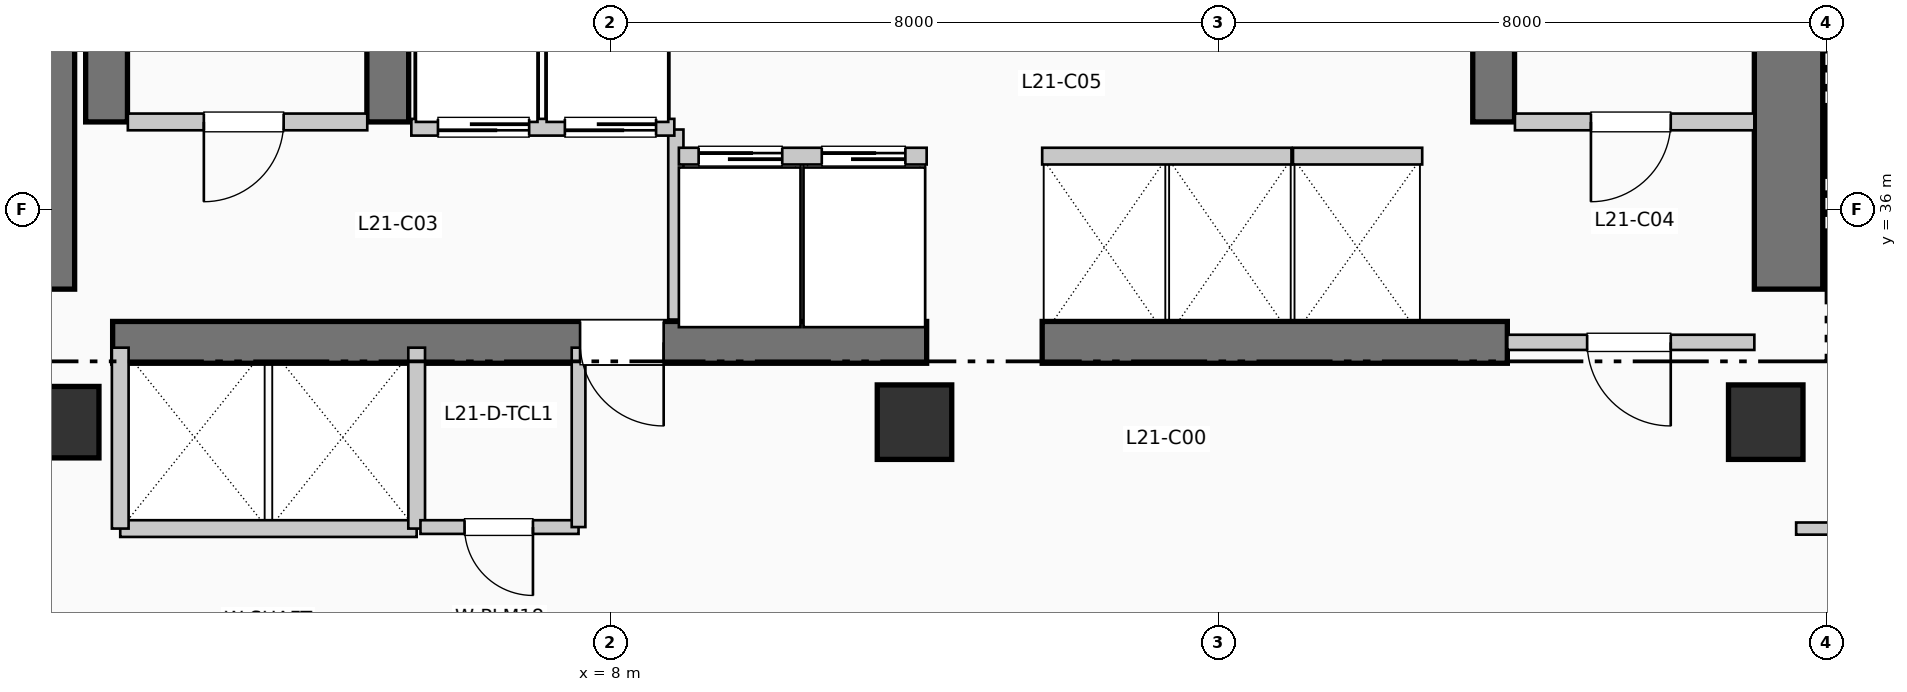
"""IFC4 building model, lengths in metres.
Left out: names, types, materials, properties, quantities, classifications, styles, units other than length and angle.
Written with IfcOpenShell. Run it as: python <this file> out.ifc"""

import sys

from ifc_helpers import new_model, si_unit, direction, frame, frame_2d, origin, origin_2d, place, context, subcontext, project, spatial, rectangle, extrude, element, fill, save


model = new_model("IFC4")
c1 = context("Model", 3, precision=1e-05, world=origin(), true_north=direction((0.0, 1.0)))
c2 = subcontext(c1, "Body", "Model", "MODEL_VIEW")
j1 = project(units=[si_unit("LENGTHUNIT", "METRE"), si_unit("PLANEANGLEUNIT", "RADIAN")], contexts=[c1])
p1 = place(None, origin())
s1 = spatial("IfcSite", under=j1, at=p1, CompositionType="ELEMENT")
p2 = place(p1, origin())
s2 = spatial("IfcBuilding", under=s1, at=p2, CompositionType="ELEMENT")
p3 = place(p2, frame((0.0, 0.0, 89.76)))
s3 = spatial("IfcBuildingStorey", under=s2, at=p3, CompositionType="ELEMENT", Elevation=89.76)
p4 = place(p3, frame((0.5, 34.95, 0.0), z_axis=(0.0, 0.0, 1.0), x_axis=(0.0, 1.0, 0.0)))
e1 = element("IfcWall", 1, at=p4, inside=s3, PredefinedType="SHEAR", context=c2, shape_type="SweptSolid", body=[
    extrude(rectangle(XDim=7.9, YDim=0.9, at=frame_2d((3.95, 0.0))), origin(), (0.0, 0.0, 1.0), 3.96),
])
p5 = place(p3, frame((23.5, 34.95, 0.0), z_axis=(0.0, 0.0, 1.0), x_axis=(0.0, 1.0, 0.0)))
e2 = element("IfcWall", 2, at=p5, inside=s3, PredefinedType="SHEAR", context=c2, shape_type="SweptSolid", body=[
    extrude(rectangle(XDim=10.64, YDim=0.9, at=frame_2d((5.32, 0.0))), origin(), (0.0, 0.0, 1.0), 3.96),
])
p6 = place(p3, frame((1.45, 34.25, 0.0), z_axis=(0.0, 0.0, 1.0), x_axis=(1.0, 0.0, 0.0)))
e3 = element("IfcWall", 3, at=p6, inside=s3, PredefinedType="SHEAR", context=c2, shape_type="SweptSolid", body=[
    extrude(rectangle(XDim=10.71, YDim=0.55, at=frame_2d((5.355, 0.0))), origin(), (0.0, 0.0, 1.0), 3.96),
])
p7 = place(p6, frame((7.25, 0.0, 0.0), z_axis=(0.0, 0.0, 1.0), x_axis=(-1.0, 0.0, 0.0)))
e4 = element("IfcOpeningElement", 4, at=p7, cuts=e3, PredefinedType="OPENING", context=c2, shape_type="SweptSolid", body=[
    extrude(rectangle(XDim=1.1, YDim=2.15, at=frame_2d((0.55, 1.075))), frame((0.0, 0.285, 0.0), z_axis=(0.0, -1.0, 0.0), x_axis=(1.0, 0.0, 0.0)), (0.0, 0.0, 1.0), 0.57),
])
p8 = place(p3, frame((13.68, 34.25, 0.0), z_axis=(0.0, 0.0, 1.0), x_axis=(1.0, 0.0, 0.0)))
e5 = element("IfcWall", 5, at=p8, inside=s3, PredefinedType="SHEAR", context=c2, shape_type="SweptSolid", body=[
    extrude(rectangle(XDim=6.12, YDim=0.55, at=frame_2d((3.06, 0.0))), origin(), (0.0, 0.0, 1.0), 3.96),
])
for number, where, z_axis, x_axis in (
    (6, (1.37, 37.15, 0.0), (0.0, 0.0, 1.0), (0.0, 1.0, 0.0)),
    (7, (5.07, 37.15, 0.0), (0.0, 0.0, 1.0), (0.0, 1.0, 0.0)),
    (8, (19.62, 37.15, 0.0), (0.0, 0.0, 1.0), (0.0, 1.0, 0.0)),
):
    element("IfcWall", number, at=place(p3, frame(where, z_axis=z_axis, x_axis=x_axis)), inside=s3, PredefinedType="SHEAR", context=c2, shape_type="SweptSolid", body=[
        extrude(rectangle(XDim=7.89, YDim=0.55, at=frame_2d((3.945, 0.0))), origin(), (0.0, 0.0, 1.0), 3.96),
    ])
p9 = place(p3, frame((0.8, 33.2, 0.0), z_axis=(0.0, 0.0, 1.0), x_axis=(1.0, 0.0, 0.0)))
e9 = element("IfcColumn", 9, at=p9, inside=s3, PredefinedType="COLUMN", context=c2, shape_type="SweptSolid", body=[
    extrude(rectangle(XDim=0.94, YDim=0.94, at=origin_2d()), origin(), (0.0, 0.0, 1.0), 3.96),
])
for number, where, z_axis, x_axis in (
    (10, (12.0, 33.2, 0.0), (0.0, 0.0, 1.0), (1.0, 0.0, 0.0)),
    (11, (23.2, 33.2, 0.0), (0.0, 0.0, 1.0), (1.0, 0.0, 0.0)),
):
    element("IfcColumn", number, at=place(p3, frame(where, z_axis=z_axis, x_axis=x_axis)), inside=s3, PredefinedType="COLUMN", context=c2, shape_type="SweptSolid", body=[
        extrude(rectangle(XDim=0.98, YDim=0.98, at=origin_2d()), origin(), (0.0, 0.0, 1.0), 3.96),
    ])
p10 = place(p3, frame((1.65, 37.15, 0.0), z_axis=(0.0, 0.0, 1.0), x_axis=(1.0, 0.0, 0.0)))
e12 = element("IfcWall", 12, at=p10, inside=s3, PredefinedType="PARTITIONING", context=c2, shape_type="SweptSolid", body=[
    extrude(rectangle(XDim=3.15, YDim=0.22, at=frame_2d((1.575, 0.0))), origin(), (0.0, 0.0, 1.0), 3.61),
])
p11 = place(p10, frame((2.05, 0.0, 0.0), z_axis=(0.0, 0.0, 1.0), x_axis=(-1.0, 0.0, 0.0)))
e13 = element("IfcOpeningElement", 13, at=p11, cuts=e12, PredefinedType="OPENING", context=c2, shape_type="SweptSolid", body=[
    extrude(rectangle(XDim=1.05, YDim=2.15, at=frame_2d((0.525, 1.075))), frame((0.0, 0.12, 0.0), z_axis=(0.0, -1.0, 0.0), x_axis=(1.0, 0.0, 0.0)), (0.0, 0.0, 1.0), 0.24),
])
p12 = place(p3, frame((8.86, 34.55, 0.0), z_axis=(0.0, 0.0, 1.0), x_axis=(0.0, 1.0, 0.0)))
e14 = element("IfcWall", 14, at=p12, inside=s3, PredefinedType="PARTITIONING", context=c2, shape_type="SweptSolid", body=[
    extrude(rectangle(XDim=2.5, YDim=0.2, at=frame_2d((1.25, 0.0))), origin(), (0.0, 0.0, 1.0), 3.61),
])
p13 = place(p3, frame((19.9, 37.15, 0.0), z_axis=(0.0, 0.0, 1.0), x_axis=(1.0, 0.0, 0.0)))
e15 = element("IfcWall", 15, at=p13, inside=s3, PredefinedType="PARTITIONING", context=c2, shape_type="SweptSolid", body=[
    extrude(rectangle(XDim=3.15, YDim=0.22, at=frame_2d((1.575, 0.0))), origin(), (0.0, 0.0, 1.0), 3.61),
])
p14 = place(p13, frame((2.05, 0.0, 0.0), z_axis=(0.0, 0.0, 1.0), x_axis=(-1.0, 0.0, 0.0)))
e16 = element("IfcOpeningElement", 16, at=p14, cuts=e15, PredefinedType="OPENING", context=c2, shape_type="SweptSolid", body=[
    extrude(rectangle(XDim=1.05, YDim=2.15, at=frame_2d((0.525, 1.075))), frame((0.0, 0.12, 0.0), z_axis=(0.0, -1.0, 0.0), x_axis=(1.0, 0.0, 0.0)), (0.0, 0.0, 1.0), 0.24),
])
p15 = place(p3, frame((19.8, 34.25, 0.0), z_axis=(0.0, 0.0, 1.0), x_axis=(1.0, 0.0, 0.0)))
e17 = element("IfcWall", 17, at=p15, inside=s3, PredefinedType="PARTITIONING", context=c2, shape_type="SweptSolid", body=[
    extrude(rectangle(XDim=3.25, YDim=0.2, at=frame_2d((1.625, 0.0))), origin(), (0.0, 0.0, 1.0), 3.61),
])
p16 = place(p15, frame((2.15, 0.0, 0.0), z_axis=(0.0, 0.0, 1.0), x_axis=(-1.0, 0.0, 0.0)))
e18 = element("IfcOpeningElement", 18, at=p16, cuts=e17, PredefinedType="OPENING", context=c2, shape_type="SweptSolid", body=[
    extrude(rectangle(XDim=1.1, YDim=2.15, at=frame_2d((0.55, 1.075))), frame((0.0, 0.11, 0.0), z_axis=(0.0, -1.0, 0.0), x_axis=(1.0, 0.0, 0.0)), (0.0, 0.0, 1.0), 0.22),
])
p17 = place(p3, frame((5.38, 37.08, 0.0), z_axis=(0.0, 0.0, 1.0), x_axis=(1.0, 0.0, 0.0)))
e19 = element("IfcWall", 19, at=p17, inside=s3, PredefinedType="PARTITIONING", context=c2, shape_type="SweptSolid", body=[
    extrude(rectangle(XDim=3.46, YDim=0.22, at=frame_2d((1.73, 0.0))), origin(), (0.0, 0.0, 1.0), 3.61),
])
p18 = place(p17, frame((1.55, 0.0, 0.0), z_axis=(0.0, 0.0, 1.0), x_axis=(-1.0, 0.0, 0.0)))
e20 = element("IfcOpeningElement", 20, at=p18, cuts=e19, PredefinedType="OPENING", context=c2, shape_type="SweptSolid", body=[
    extrude(rectangle(XDim=1.2, YDim=2.2, at=frame_2d((0.6, 1.1))), frame((0.0, 0.12, 0.0), z_axis=(0.0, -1.0, 0.0), x_axis=(1.0, 0.0, 0.0)), (0.0, 0.0, 1.0), 0.24),
])
p19 = place(p17, frame((3.22, 0.0, 0.0), z_axis=(0.0, 0.0, 1.0), x_axis=(-1.0, 0.0, 0.0)))
e21 = element("IfcOpeningElement", 21, at=p19, cuts=e19, PredefinedType="OPENING", context=c2, shape_type="SweptSolid", body=[
    extrude(rectangle(XDim=1.2, YDim=2.2, at=frame_2d((0.6, 1.1))), frame((0.0, 0.12, 0.0), z_axis=(0.0, -1.0, 0.0), x_axis=(1.0, 0.0, 0.0)), (0.0, 0.0, 1.0), 0.24),
])
p20 = place(p3, frame((1.55, 31.8, 0.0), z_axis=(0.0, 0.0, 1.0), x_axis=(1.0, 0.0, 0.0)))
e22 = element("IfcWall", 22, at=p20, inside=s3, PredefinedType="PARTITIONING", context=c2, shape_type="SweptSolid", body=[
    extrude(rectangle(XDim=3.9, YDim=0.22, at=frame_2d((1.95, 0.0))), origin(), (0.0, 0.0, 1.0), 3.61),
])
for number, where, z_axis, x_axis in (
    (23, (1.55, 31.8, 0.0), (0.0, 0.0, 1.0), (0.0, 1.0, 0.0)),
    (24, (5.45, 31.8, 0.0), (0.0, 0.0, 1.0), (0.0, 1.0, 0.0)),
):
    element("IfcWall", number, at=place(p3, frame(where, z_axis=z_axis, x_axis=x_axis)), inside=s3, PredefinedType="PARTITIONING", context=c2, shape_type="SweptSolid", body=[
        extrude(rectangle(XDim=2.38, YDim=0.22, at=frame_2d((1.19, 0.0))), origin(), (0.0, 0.0, 1.0), 3.61),
    ])
p21 = place(p3, frame((5.5, 31.82, 0.0), z_axis=(0.0, 0.0, 1.0), x_axis=(1.0, 0.0, 0.0)))
e25 = element("IfcWall", 25, at=p21, inside=s3, PredefinedType="PLUMBINGWALL", context=c2, shape_type="SweptSolid", body=[
    extrude(rectangle(XDim=2.08, YDim=0.18, at=frame_2d((1.04, 0.0))), origin(), (0.0, 0.0, 1.0), 3.61),
])
p22 = place(p21, frame((1.48, 0.0, 0.0), z_axis=(0.0, 0.0, 1.0), x_axis=(-1.0, 0.0, 0.0)))
e26 = element("IfcOpeningElement", 26, at=p22, cuts=e25, PredefinedType="OPENING", context=c2, shape_type="SweptSolid", body=[
    extrude(rectangle(XDim=0.9, YDim=2.1, at=frame_2d((0.45, 1.05))), frame((0.0, 0.1, 0.0), z_axis=(0.0, -1.0, 0.0), x_axis=(1.0, 0.0, 0.0)), (0.0, 0.0, 1.0), 0.2),
])
p23 = place(p3, frame((7.58, 31.82, 0.0), z_axis=(0.0, 0.0, 1.0), x_axis=(0.0, 1.0, 0.0)))
e27 = element("IfcWall", 27, at=p23, inside=s3, PredefinedType="PLUMBINGWALL", context=c2, shape_type="SweptSolid", body=[
    extrude(rectangle(XDim=2.36, YDim=0.18, at=frame_2d((1.18, 0.0))), origin(), (0.0, 0.0, 1.0), 3.61),
])
p24 = place(p3, frame((8.9, 36.7, 0.0), z_axis=(0.0, 0.0, 1.0), x_axis=(1.0, 0.0, 0.0)))
e28 = element("IfcWall", 28, at=p24, inside=s3, PredefinedType="PARTITIONING", context=c2, shape_type="SweptSolid", body=[
    extrude(rectangle(XDim=3.26, YDim=0.22, at=frame_2d((1.63, 0.0))), origin(), (0.0, 0.0, 1.0), 3.61),
])
p25 = place(p24, frame((0.26, 0.0, 0.0)))
e29 = element("IfcOpeningElement", 29, at=p25, cuts=e28, PredefinedType="OPENING", context=c2, shape_type="SweptSolid", body=[
    extrude(rectangle(XDim=1.1, YDim=2.2, at=frame_2d((0.55, 1.1))), frame((0.0, 0.12, 0.0), z_axis=(0.0, -1.0, 0.0), x_axis=(1.0, 0.0, 0.0)), (0.0, 0.0, 1.0), 0.24),
])
p26 = place(p24, frame((1.88, 0.0, 0.0)))
e30 = element("IfcOpeningElement", 30, at=p26, cuts=e28, PredefinedType="OPENING", context=c2, shape_type="SweptSolid", body=[
    extrude(rectangle(XDim=1.1, YDim=2.2, at=frame_2d((0.55, 1.1))), frame((0.0, 0.12, 0.0), z_axis=(0.0, -1.0, 0.0), x_axis=(1.0, 0.0, 0.0)), (0.0, 0.0, 1.0), 0.24),
])
p27 = place(p3, frame((13.68, 36.7, 0.0), z_axis=(0.0, 0.0, 1.0), x_axis=(1.0, 0.0, 0.0)))
e31 = element("IfcWall", 31, at=p27, inside=s3, PredefinedType="PARTITIONING", context=c2, shape_type="SweptSolid", body=[
    extrude(rectangle(XDim=3.28, YDim=0.22, at=frame_2d((1.64, 0.0))), origin(), (0.0, 0.0, 1.0), 3.61),
])
p28 = place(p3, frame((16.98, 36.7, 0.0), z_axis=(0.0, 0.0, 1.0), x_axis=(1.0, 0.0, 0.0)))
e32 = element("IfcWall", 32, at=p28, inside=s3, PredefinedType="PARTITIONING", context=c2, shape_type="SweptSolid", body=[
    extrude(rectangle(XDim=1.7, YDim=0.22, at=frame_2d((0.85, 0.0))), origin(), (0.0, 0.0, 1.0), 3.61),
])
p29 = place(p3, frame((23.6, 31.8, 0.0), z_axis=(0.0, 0.0, 1.0), x_axis=(1.0, 0.0, 0.0)))
e33 = element("IfcWall", 33, at=p29, inside=s3, PredefinedType="PARTITIONING", context=c2, shape_type="SweptSolid", body=[
    extrude(rectangle(XDim=32.21, YDim=0.16, at=frame_2d((16.105, 0.0))), origin(), (0.0, 0.0, 1.0), 3.61),
])
p30 = place(p29, frame((3.712, 0.0, 0.0)))
e34 = element("IfcOpeningElement", 34, at=p30, cuts=e33, PredefinedType="OPENING", context=c2, shape_type="SweptSolid", body=[
    extrude(rectangle(XDim=0.95, YDim=2.15, at=frame_2d((0.475, 1.075))), frame((0.0, 0.09, 0.0), z_axis=(0.0, -1.0, 0.0), x_axis=(1.0, 0.0, 0.0)), (0.0, 0.0, 1.0), 0.18),
])
p31 = place(p29, frame((12.731, 0.0, 0.0)))
e35 = element("IfcOpeningElement", 35, at=p31, cuts=e33, PredefinedType="OPENING", context=c2, shape_type="SweptSolid", body=[
    extrude(rectangle(XDim=0.95, YDim=2.15, at=frame_2d((0.475, 1.075))), frame((0.0, 0.09, 0.0), z_axis=(0.0, -1.0, 0.0), x_axis=(1.0, 0.0, 0.0)), (0.0, 0.0, 1.0), 0.18),
])
p32 = place(p29, frame((21.589, 0.0, 0.0)))
e36 = element("IfcOpeningElement", 36, at=p32, cuts=e33, PredefinedType="OPENING", context=c2, shape_type="SweptSolid", body=[
    extrude(rectangle(XDim=0.95, YDim=2.15, at=frame_2d((0.475, 1.075))), frame((0.0, 0.09, 0.0), z_axis=(0.0, -1.0, 0.0), x_axis=(1.0, 0.0, 0.0)), (0.0, 0.0, 1.0), 0.18),
])
p33 = place(p29, frame((28.675, 0.0, 0.0)))
e37 = element("IfcOpeningElement", 37, at=p33, cuts=e33, PredefinedType="OPENING", context=c2, shape_type="SweptSolid", body=[
    extrude(rectangle(XDim=0.95, YDim=2.15, at=frame_2d((0.475, 1.075))), frame((0.0, 0.09, 0.0), z_axis=(0.0, -1.0, 0.0), x_axis=(1.0, 0.0, 0.0)), (0.0, 0.0, 1.0), 0.18),
])
p34 = place(p11, origin())
e38 = element("IfcDoor", 38, at=p34, inside=s3, OperationType="SINGLE_SWING_LEFT", PredefinedType="DOOR", context=c2, shape_type="SweptSolid", body=[
    extrude(rectangle(XDim=1.05, YDim=2.15, at=frame_2d((0.525, 1.075))), frame((0.0, 0.025, 0.0), z_axis=(0.0, -1.0, 0.0), x_axis=(1.0, 0.0, 0.0)), (0.0, 0.0, 1.0), 0.05),
])
fill(e13, e38)
p35 = place(p7, origin())
e39 = element("IfcDoor", 39, at=p35, inside=s3, OperationType="SINGLE_SWING_RIGHT", PredefinedType="DOOR", context=c2, shape_type="SweptSolid", body=[
    extrude(rectangle(XDim=1.1, YDim=2.15, at=frame_2d((0.55, 1.075))), frame((0.0, 0.025, 0.0), z_axis=(0.0, -1.0, 0.0), x_axis=(1.0, 0.0, 0.0)), (0.0, 0.0, 1.0), 0.05),
])
fill(e4, e39)
p36 = place(p14, origin())
e40 = element("IfcDoor", 40, at=p36, inside=s3, OperationType="SINGLE_SWING_LEFT", PredefinedType="DOOR", context=c2, shape_type="SweptSolid", body=[
    extrude(rectangle(XDim=1.05, YDim=2.15, at=frame_2d((0.525, 1.075))), frame((0.0, 0.025, 0.0), z_axis=(0.0, -1.0, 0.0), x_axis=(1.0, 0.0, 0.0)), (0.0, 0.0, 1.0), 0.05),
])
fill(e16, e40)
p37 = place(p16, origin())
e41 = element("IfcDoor", 41, at=p37, inside=s3, OperationType="SINGLE_SWING_RIGHT", PredefinedType="DOOR", context=c2, shape_type="SweptSolid", body=[
    extrude(rectangle(XDim=1.1, YDim=2.15, at=frame_2d((0.55, 1.075))), frame((0.0, 0.025, 0.0), z_axis=(0.0, -1.0, 0.0), x_axis=(1.0, 0.0, 0.0)), (0.0, 0.0, 1.0), 0.05),
])
fill(e18, e41)
p38 = place(p18, origin())
e42 = element("IfcDoor", 42, at=p38, inside=s3, OperationType="SLIDING_TO_RIGHT", PredefinedType="DOOR", context=c2, shape_type="SweptSolid", body=[
    extrude(rectangle(XDim=1.2, YDim=2.2, at=frame_2d((0.6, 1.1))), frame((0.0, 0.025, 0.0), z_axis=(0.0, -1.0, 0.0), x_axis=(1.0, 0.0, 0.0)), (0.0, 0.0, 1.0), 0.05),
])
fill(e20, e42)
p39 = place(p19, origin())
e43 = element("IfcDoor", 43, at=p39, inside=s3, OperationType="SLIDING_TO_RIGHT", PredefinedType="DOOR", context=c2, shape_type="SweptSolid", body=[
    extrude(rectangle(XDim=1.2, YDim=2.2, at=frame_2d((0.6, 1.1))), frame((0.0, 0.025, 0.0), z_axis=(0.0, -1.0, 0.0), x_axis=(1.0, 0.0, 0.0)), (0.0, 0.0, 1.0), 0.05),
])
fill(e21, e43)
p40 = place(p22, origin())
e44 = element("IfcDoor", 44, at=p40, inside=s3, OperationType="SINGLE_SWING_RIGHT", PredefinedType="DOOR", context=c2, shape_type="SweptSolid", body=[
    extrude(rectangle(XDim=0.9, YDim=2.1, at=frame_2d((0.45, 1.05))), frame((0.0, 0.025, 0.0), z_axis=(0.0, -1.0, 0.0), x_axis=(1.0, 0.0, 0.0)), (0.0, 0.0, 1.0), 0.05),
])
fill(e26, e44)
p41 = place(p25, origin())
e45 = element("IfcDoor", 45, at=p41, inside=s3, OperationType="SLIDING_TO_LEFT", PredefinedType="DOOR", context=c2, shape_type="SweptSolid", body=[
    extrude(rectangle(XDim=1.1, YDim=2.2, at=frame_2d((0.55, 1.1))), frame((0.0, 0.025, 0.0), z_axis=(0.0, -1.0, 0.0), x_axis=(1.0, 0.0, 0.0)), (0.0, 0.0, 1.0), 0.05),
])
fill(e29, e45)
p42 = place(p26, origin())
e46 = element("IfcDoor", 46, at=p42, inside=s3, OperationType="SLIDING_TO_LEFT", PredefinedType="DOOR", context=c2, shape_type="SweptSolid", body=[
    extrude(rectangle(XDim=1.1, YDim=2.2, at=frame_2d((0.55, 1.1))), frame((0.0, 0.025, 0.0), z_axis=(0.0, -1.0, 0.0), x_axis=(1.0, 0.0, 0.0)), (0.0, 0.0, 1.0), 0.05),
])
fill(e30, e46)
save(model, sys.argv[1])
